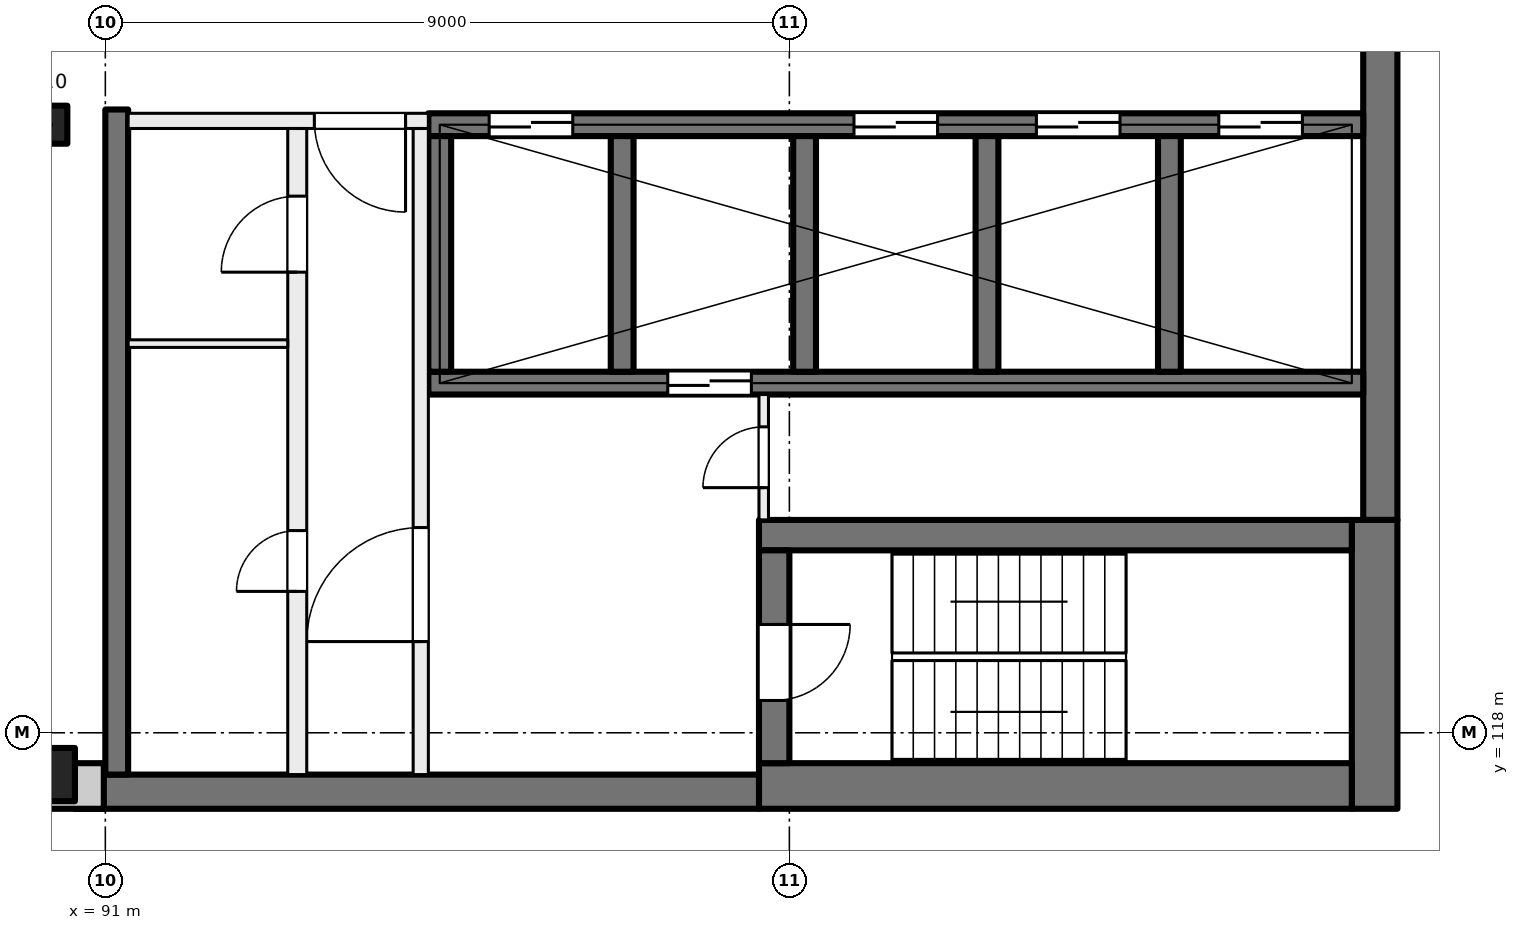
"""IFC4 building model, lengths in metres.
Left out: names, types, materials, properties, quantities, classifications, styles, units other than length and angle.
Written with IfcOpenShell. Run it as: python <this file> out.ifc"""

import sys

from ifc_helpers import new_model, si_unit, direction, frame, frame_2d, origin, origin_2d, place, context, subcontext, project, spatial, rectangle, extrude, element, fill, save


model = new_model("IFC4")
c1 = context("Model", 3, precision=1e-05, world=origin(), true_north=direction((0.0, 1.0)))
c2 = subcontext(c1, "Body", "Model", "MODEL_VIEW")
j1 = project(units=[si_unit("LENGTHUNIT", "METRE"), si_unit("PLANEANGLEUNIT", "RADIAN")], contexts=[c1])
p1 = place(None, origin())
s1 = spatial("IfcSite", under=j1, at=p1, CompositionType="ELEMENT")
p2 = place(p1, origin())
s2 = spatial("IfcBuilding", under=s1, at=p2, CompositionType="ELEMENT")
p3 = place(p2, frame((0.0, 0.0, 261.5)))
s3 = spatial("IfcBuildingStorey", under=s2, at=p3, CompositionType="ELEMENT", Elevation=261.5)
p4 = place(p3, frame((90.25, 126.0, 0.0), z_axis=(0.0, 0.0, 1.0), x_axis=(1.0, 0.0, 0.0)))
e1 = element("IfcColumn", 1, at=p4, inside=s3, PredefinedType="COLUMN", context=c2, shape_type="SweptSolid", body=[
    extrude(rectangle(XDim=0.5, YDim=0.5, at=origin_2d()), origin(), (0.0, 0.0, 1.0), 4.0),
])
p5 = place(p3, frame((90.25, 117.45, 0.0), z_axis=(0.0, 0.0, 1.0), x_axis=(1.0, 0.0, 0.0)))
e2 = element("IfcColumn", 2, at=p5, inside=s3, PredefinedType="COLUMN", context=c2, shape_type="SweptSolid", body=[
    extrude(rectangle(XDim=0.7, YDim=0.7, at=origin_2d()), origin(), (0.0, 0.0, 1.0), 4.0),
])
p6 = place(p3, frame((107.775, 135.2, 0.0), z_axis=(0.0, 0.0, 1.0), x_axis=(0.0, -1.0, 0.0)))
e3 = element("IfcWall", 3, at=p6, inside=s3, PredefinedType="SHEAR", context=c2, shape_type="SweptSolid", body=[
    extrude(rectangle(XDim=14.4, YDim=0.45, at=frame_2d((7.2, 0.0))), origin(), (0.0, 0.0, 1.0), 4.0),
])
p7 = place(p3, frame((107.7, 120.8, 0.0), z_axis=(0.0, 0.0, 1.0), x_axis=(0.0, -1.0, 0.0)))
e4 = element("IfcWall", 4, at=p7, inside=s3, PredefinedType="SHEAR", context=c2, shape_type="SweptSolid", body=[
    extrude(rectangle(XDim=3.8, YDim=0.6, at=frame_2d((1.9, 0.0))), origin(), (0.0, 0.0, 1.0), 4.0),
])
p8 = place(p3, frame((107.4, 117.3, 0.0), z_axis=(0.0, 0.0, 1.0), x_axis=(-1.0, 0.0, 0.0)))
e5 = element("IfcWall", 5, at=p8, inside=s3, PredefinedType="SHEAR", context=c2, shape_type="SweptSolid", body=[
    extrude(rectangle(XDim=7.8, YDim=0.6, at=frame_2d((3.9, 0.0))), origin(), (0.0, 0.0, 1.0), 4.0),
])
p9 = place(p3, frame((99.6, 117.225, 0.0), z_axis=(0.0, 0.0, 1.0), x_axis=(-1.0, 0.0, 0.0)))
e6 = element("IfcWall", 6, at=p9, inside=s3, PredefinedType="SHEAR", context=c2, shape_type="SweptSolid", body=[
    extrude(rectangle(XDim=9.0, YDim=0.45, at=frame_2d((4.5, 0.0))), origin(), (0.0, 0.0, 1.0), 4.0),
])
p10 = place(p3, frame((107.4, 120.6, 0.0), z_axis=(0.0, 0.0, 1.0), x_axis=(-1.0, 0.0, 0.0)))
e7 = element("IfcWall", 7, at=p10, inside=s3, PredefinedType="SHEAR", context=c2, shape_type="SweptSolid", body=[
    extrude(rectangle(XDim=7.8, YDim=0.4, at=frame_2d((3.9, 0.0))), origin(), (0.0, 0.0, 1.0), 4.0),
])
p11 = place(p3, frame((99.8, 120.4, 0.0), z_axis=(0.0, 0.0, 1.0), x_axis=(0.0, -1.0, 0.0)))
e8 = element("IfcWall", 8, at=p11, inside=s3, PredefinedType="SHEAR", context=c2, shape_type="SweptSolid", body=[
    extrude(rectangle(XDim=2.8, YDim=0.4, at=frame_2d((1.4, 0.0))), origin(), (0.0, 0.0, 1.0), 4.0),
])
p12 = place(p11, frame((0.975, 0.0, 0.0)))
e9 = element("IfcOpeningElement", 9, at=p12, cuts=e8, PredefinedType="OPENING", context=c2, shape_type="SweptSolid", body=[
    extrude(rectangle(XDim=1.0, YDim=2.1, at=frame_2d((0.5, 1.05))), frame((0.0, 0.21, 0.0), z_axis=(0.0, -1.0, 0.0), x_axis=(1.0, 0.0, 0.0)), (0.0, 0.0, 1.0), 0.42),
])
p13 = place(p3, frame((107.55, 126.0, 0.0), z_axis=(0.0, 0.0, 1.0), x_axis=(-1.0, 0.0, 0.0)))
e10 = element("IfcWall", 10, at=p13, inside=s3, PredefinedType="SHEAR", context=c2, shape_type="SweptSolid", body=[
    extrude(rectangle(XDim=12.3, YDim=0.3, at=frame_2d((6.15, 0.0))), origin(), (0.0, 0.0, 1.0), 4.0),
])
p14 = place(p13, frame((0.8, 0.0, 0.0)))
e11 = element("IfcOpeningElement", 11, at=p14, cuts=e10, PredefinedType="OPENING", context=c2, shape_type="SweptSolid", body=[
    extrude(rectangle(XDim=1.1, YDim=2.1, at=frame_2d((0.55, 1.05))), frame((0.0, 0.16, 0.0), z_axis=(0.0, -1.0, 0.0), x_axis=(1.0, 0.0, 0.0)), (0.0, 0.0, 1.0), 0.32),
])
p15 = place(p13, frame((3.2, 0.0, 0.0)))
e12 = element("IfcOpeningElement", 12, at=p15, cuts=e10, PredefinedType="OPENING", context=c2, shape_type="SweptSolid", body=[
    extrude(rectangle(XDim=1.1, YDim=2.1, at=frame_2d((0.55, 1.05))), frame((0.0, 0.16, 0.0), z_axis=(0.0, -1.0, 0.0), x_axis=(1.0, 0.0, 0.0)), (0.0, 0.0, 1.0), 0.32),
])
p16 = place(p13, frame((5.6, 0.0, 0.0)))
e13 = element("IfcOpeningElement", 13, at=p16, cuts=e10, PredefinedType="OPENING", context=c2, shape_type="SweptSolid", body=[
    extrude(rectangle(XDim=1.1, YDim=2.1, at=frame_2d((0.55, 1.05))), frame((0.0, 0.16, 0.0), z_axis=(0.0, -1.0, 0.0), x_axis=(1.0, 0.0, 0.0)), (0.0, 0.0, 1.0), 0.32),
])
p17 = place(p13, frame((10.4, 0.0, 0.0)))
e14 = element("IfcOpeningElement", 14, at=p17, cuts=e10, PredefinedType="OPENING", context=c2, shape_type="SweptSolid", body=[
    extrude(rectangle(XDim=1.1, YDim=2.1, at=frame_2d((0.55, 1.05))), frame((0.0, 0.16, 0.0), z_axis=(0.0, -1.0, 0.0), x_axis=(1.0, 0.0, 0.0)), (0.0, 0.0, 1.0), 0.32),
])
p18 = place(p3, frame((107.55, 122.6, 0.0), z_axis=(0.0, 0.0, 1.0), x_axis=(-1.0, 0.0, 0.0)))
e15 = element("IfcWall", 15, at=p18, inside=s3, PredefinedType="SHEAR", context=c2, shape_type="SweptSolid", body=[
    extrude(rectangle(XDim=12.3, YDim=0.3, at=frame_2d((6.15, 0.0))), origin(), (0.0, 0.0, 1.0), 4.0),
])
p19 = place(p18, frame((8.05, 0.0, 0.0)))
e16 = element("IfcOpeningElement", 16, at=p19, cuts=e15, PredefinedType="OPENING", context=c2, shape_type="SweptSolid", body=[
    extrude(rectangle(XDim=1.1, YDim=2.1, at=frame_2d((0.55, 1.05))), frame((0.0, 0.16, 0.0), z_axis=(0.0, -1.0, 0.0), x_axis=(1.0, 0.0, 0.0)), (0.0, 0.0, 1.0), 0.32),
])
for number, where, z_axis, x_axis in (
    (17, (105.0, 125.85, 0.0), (0.0, 0.0, 1.0), (0.0, -1.0, 0.0)),
    (18, (102.6, 125.85, 0.0), (0.0, 0.0, 1.0), (0.0, -1.0, 0.0)),
    (19, (100.2, 125.85, 0.0), (0.0, 0.0, 1.0), (0.0, -1.0, 0.0)),
    (20, (97.8, 125.85, 0.0), (0.0, 0.0, 1.0), (0.0, -1.0, 0.0)),
    (21, (95.4, 125.85, 0.0), (0.0, 0.0, 1.0), (0.0, -1.0, 0.0)),
):
    element("IfcWall", number, at=place(p3, frame(where, z_axis=z_axis, x_axis=x_axis)), inside=s3, PredefinedType="SHEAR", context=c2, shape_type="SweptSolid", body=[
        extrude(rectangle(XDim=3.1, YDim=0.3, at=frame_2d((1.55, 0.0))), origin(), (0.0, 0.0, 1.0), 4.0),
    ])
p20 = place(p3, frame((91.15, 126.2, 0.0), z_axis=(0.0, 0.0, 1.0), x_axis=(0.0, -1.0, 0.0)))
e22 = element("IfcWall", 22, at=p20, inside=s3, PredefinedType="SHEAR", context=c2, shape_type="SweptSolid", body=[
    extrude(rectangle(XDim=8.75, YDim=0.3, at=frame_2d((4.375, 0.0))), origin(), (0.0, 0.0, 1.0), 4.0),
])
p21 = place(p3, frame((90.98, 117.3, 0.0), z_axis=(0.0, 0.0, 1.0), x_axis=(-1.0, 0.0, 0.0)))
e23 = element("IfcWall", 23, at=p21, inside=s3, PredefinedType="SOLIDWALL", context=c2, shape_type="SweptSolid", body=[
    extrude(rectangle(XDim=43.98, YDim=0.6, at=frame_2d((21.99, 0.0))), origin(), (0.0, 0.0, 1.0), 3.625),
])
p22 = place(p21, frame((1.48, 0.0, 0.9)))
e24 = element("IfcOpeningElement", 24, at=p22, cuts=e23, PredefinedType="OPENING", context=c2, shape_type="SweptSolid", body=[
    extrude(rectangle(XDim=3.0, YDim=2.4, at=frame_2d((1.5, 1.2))), frame((0.0, 0.31, 0.0), z_axis=(0.0, -1.0, 0.0), x_axis=(1.0, 0.0, 0.0)), (0.0, 0.0, 1.0), 0.62),
])
p23 = place(p21, frame((5.98, 0.0, 0.9)))
e25 = element("IfcOpeningElement", 25, at=p23, cuts=e23, PredefinedType="OPENING", context=c2, shape_type="SweptSolid", body=[
    extrude(rectangle(XDim=3.0, YDim=2.4, at=frame_2d((1.5, 1.2))), frame((0.0, 0.31, 0.0), z_axis=(0.0, -1.0, 0.0), x_axis=(1.0, 0.0, 0.0)), (0.0, 0.0, 1.0), 0.62),
])
p24 = place(p21, frame((10.48, 0.0, 0.9)))
e26 = element("IfcOpeningElement", 26, at=p24, cuts=e23, PredefinedType="OPENING", context=c2, shape_type="SweptSolid", body=[
    extrude(rectangle(XDim=3.0, YDim=2.4, at=frame_2d((1.5, 1.2))), frame((0.0, 0.31, 0.0), z_axis=(0.0, -1.0, 0.0), x_axis=(1.0, 0.0, 0.0)), (0.0, 0.0, 1.0), 0.62),
])
p25 = place(p21, frame((14.98, 0.0, 0.9)))
e27 = element("IfcOpeningElement", 27, at=p25, cuts=e23, PredefinedType="OPENING", context=c2, shape_type="SweptSolid", body=[
    extrude(rectangle(XDim=3.0, YDim=2.4, at=frame_2d((1.5, 1.2))), frame((0.0, 0.31, 0.0), z_axis=(0.0, -1.0, 0.0), x_axis=(1.0, 0.0, 0.0)), (0.0, 0.0, 1.0), 0.62),
])
p26 = place(p21, frame((19.48, 0.0, 0.9)))
e28 = element("IfcOpeningElement", 28, at=p26, cuts=e23, PredefinedType="OPENING", context=c2, shape_type="SweptSolid", body=[
    extrude(rectangle(XDim=3.0, YDim=2.4, at=frame_2d((1.5, 1.2))), frame((0.0, 0.31, 0.0), z_axis=(0.0, -1.0, 0.0), x_axis=(1.0, 0.0, 0.0)), (0.0, 0.0, 1.0), 0.62),
])
p27 = place(p21, frame((23.98, 0.0, 0.9)))
e29 = element("IfcOpeningElement", 29, at=p27, cuts=e23, PredefinedType="OPENING", context=c2, shape_type="SweptSolid", body=[
    extrude(rectangle(XDim=3.0, YDim=2.4, at=frame_2d((1.5, 1.2))), frame((0.0, 0.31, 0.0), z_axis=(0.0, -1.0, 0.0), x_axis=(1.0, 0.0, 0.0)), (0.0, 0.0, 1.0), 0.62),
])
p28 = place(p21, frame((28.48, 0.0, 0.9)))
e30 = element("IfcOpeningElement", 30, at=p28, cuts=e23, PredefinedType="OPENING", context=c2, shape_type="SweptSolid", body=[
    extrude(rectangle(XDim=3.0, YDim=2.4, at=frame_2d((1.5, 1.2))), frame((0.0, 0.31, 0.0), z_axis=(0.0, -1.0, 0.0), x_axis=(1.0, 0.0, 0.0)), (0.0, 0.0, 1.0), 0.62),
])
p29 = place(p21, frame((32.98, 0.0, 0.9)))
e31 = element("IfcOpeningElement", 31, at=p29, cuts=e23, PredefinedType="OPENING", context=c2, shape_type="SweptSolid", body=[
    extrude(rectangle(XDim=3.0, YDim=2.4, at=frame_2d((1.5, 1.2))), frame((0.0, 0.31, 0.0), z_axis=(0.0, -1.0, 0.0), x_axis=(1.0, 0.0, 0.0)), (0.0, 0.0, 1.0), 0.62),
])
p30 = place(p21, frame((37.48, 0.0, 0.9)))
e32 = element("IfcOpeningElement", 32, at=p30, cuts=e23, PredefinedType="OPENING", context=c2, shape_type="SweptSolid", body=[
    extrude(rectangle(XDim=3.0, YDim=2.4, at=frame_2d((1.5, 1.2))), frame((0.0, 0.31, 0.0), z_axis=(0.0, -1.0, 0.0), x_axis=(1.0, 0.0, 0.0)), (0.0, 0.0, 1.0), 0.62),
])
p31 = place(p3, frame((95.25, 126.05, 0.0), z_axis=(0.0, 0.0, 1.0), x_axis=(-1.0, 0.0, 0.0)))
e33 = element("IfcWall", 33, at=p31, inside=s3, PredefinedType="PARTITIONING", context=c2, shape_type="SweptSolid", body=[
    extrude(rectangle(XDim=3.95, YDim=0.2, at=frame_2d((1.975, 0.0))), origin(), (0.0, 0.0, 1.0), 3.625),
])
p32 = place(p31, frame((0.3, 0.0, 0.0)))
e34 = element("IfcOpeningElement", 34, at=p32, cuts=e33, PredefinedType="OPENING", context=c2, shape_type="SweptSolid", body=[
    extrude(rectangle(XDim=1.2, YDim=2.1, at=frame_2d((0.6, 1.05))), frame((0.0, 0.11, 0.0), z_axis=(0.0, -1.0, 0.0), x_axis=(1.0, 0.0, 0.0)), (0.0, 0.0, 1.0), 0.22),
])
p33 = place(p3, frame((95.15, 117.45, 0.0), z_axis=(0.0, 0.0, 1.0), x_axis=(0.0, 1.0, 0.0)))
e35 = element("IfcWall", 35, at=p33, inside=s3, PredefinedType="PARTITIONING", context=c2, shape_type="SweptSolid", body=[
    extrude(rectangle(XDim=8.5, YDim=0.2, at=frame_2d((4.25, 0.0))), origin(), (0.0, 0.0, 1.0), 3.625),
])
p34 = place(p33, frame((1.75, 0.0, 0.0)))
e36 = element("IfcOpeningElement", 36, at=p34, cuts=e35, PredefinedType="OPENING", context=c2, shape_type="SweptSolid", body=[
    extrude(rectangle(XDim=1.5, YDim=2.1, at=frame_2d((0.75, 1.05))), frame((0.0, 0.11, 0.0), z_axis=(0.0, -1.0, 0.0), x_axis=(1.0, 0.0, 0.0)), (0.0, 0.0, 1.0), 0.22),
])
p35 = place(p3, frame((93.525, 117.45, 0.0), z_axis=(0.0, 0.0, 1.0), x_axis=(0.0, 1.0, 0.0)))
e37 = element("IfcWall", 37, at=p35, inside=s3, PredefinedType="PARTITIONING", context=c2, shape_type="SweptSolid", body=[
    extrude(rectangle(XDim=8.5, YDim=0.25, at=frame_2d((4.25, 0.0))), origin(), (0.0, 0.0, 1.0), 3.625),
])
p36 = place(p35, frame((6.61, 0.0, 0.0)))
e38 = element("IfcOpeningElement", 38, at=p36, cuts=e37, PredefinedType="OPENING", context=c2, shape_type="SweptSolid", body=[
    extrude(rectangle(XDim=1.0, YDim=2.1, at=frame_2d((0.5, 1.05))), frame((0.0, 0.135, 0.0), z_axis=(0.0, -1.0, 0.0), x_axis=(1.0, 0.0, 0.0)), (0.0, 0.0, 1.0), 0.27),
])
p37 = place(p35, frame((2.41, 0.0, 0.0)))
e39 = element("IfcOpeningElement", 39, at=p37, cuts=e37, PredefinedType="OPENING", context=c2, shape_type="SweptSolid", body=[
    extrude(rectangle(XDim=0.8, YDim=2.1, at=frame_2d((0.4, 1.05))), frame((0.0, 0.135, 0.0), z_axis=(0.0, -1.0, 0.0), x_axis=(1.0, 0.0, 0.0)), (0.0, 0.0, 1.0), 0.27),
])
p38 = place(p3, frame((99.663, 120.8, 0.0), z_axis=(0.0, 0.0, 1.0), x_axis=(0.0, 1.0, 0.0)))
e40 = element("IfcWall", 40, at=p38, inside=s3, PredefinedType="PARTITIONING", context=c2, shape_type="SweptSolid", body=[
    extrude(rectangle(XDim=1.65, YDim=0.125, at=frame_2d((0.825, 0.0))), origin(), (0.0, 0.0, 1.0), 3.625),
])
p39 = place(p38, frame((0.425, 0.0, 0.0)))
e41 = element("IfcOpeningElement", 41, at=p39, cuts=e40, PredefinedType="OPENING", context=c2, shape_type="SweptSolid", body=[
    extrude(rectangle(XDim=0.8, YDim=2.1, at=frame_2d((0.4, 1.05))), frame((0.0, 0.073, 0.0), z_axis=(0.0, -1.0, 0.0), x_axis=(1.0, 0.0, 0.0)), (0.0, 0.0, 1.0), 0.145),
])
p40 = place(p3, frame((93.4, 123.12, 0.0), z_axis=(0.0, 0.0, 1.0), x_axis=(-1.0, 0.0, 0.0)))
e42 = element("IfcWall", 42, at=p40, inside=s3, PredefinedType="PARTITIONING", context=c2, shape_type="SweptSolid", body=[
    extrude(rectangle(XDim=2.1, YDim=0.1, at=frame_2d((1.05, 0.0))), origin(), (0.0, 0.0, 1.0), 3.625),
])
p41 = place(p14, origin())
e43 = element("IfcDoor", 43, at=p41, inside=s3, OperationType="DOUBLE_DOOR_SLIDING", PredefinedType="DOOR", context=c2, shape_type="SweptSolid", body=[
    extrude(rectangle(XDim=1.1, YDim=2.1, at=frame_2d((0.55, 1.05))), frame((0.0, 0.025, 0.0), z_axis=(0.0, -1.0, 0.0), x_axis=(1.0, 0.0, 0.0)), (0.0, 0.0, 1.0), 0.05),
])
fill(e11, e43)
p42 = place(p15, origin())
e44 = element("IfcDoor", 44, at=p42, inside=s3, OperationType="DOUBLE_DOOR_SLIDING", PredefinedType="DOOR", context=c2, shape_type="SweptSolid", body=[
    extrude(rectangle(XDim=1.1, YDim=2.1, at=frame_2d((0.55, 1.05))), frame((0.0, 0.025, 0.0), z_axis=(0.0, -1.0, 0.0), x_axis=(1.0, 0.0, 0.0)), (0.0, 0.0, 1.0), 0.05),
])
fill(e12, e44)
p43 = place(p16, origin())
e45 = element("IfcDoor", 45, at=p43, inside=s3, OperationType="DOUBLE_DOOR_SLIDING", PredefinedType="DOOR", context=c2, shape_type="SweptSolid", body=[
    extrude(rectangle(XDim=1.1, YDim=2.1, at=frame_2d((0.55, 1.05))), frame((0.0, 0.025, 0.0), z_axis=(0.0, -1.0, 0.0), x_axis=(1.0, 0.0, 0.0)), (0.0, 0.0, 1.0), 0.05),
])
fill(e13, e45)
p44 = place(p17, origin())
e46 = element("IfcDoor", 46, at=p44, inside=s3, OperationType="DOUBLE_DOOR_SLIDING", PredefinedType="DOOR", context=c2, shape_type="SweptSolid", body=[
    extrude(rectangle(XDim=1.1, YDim=2.1, at=frame_2d((0.55, 1.05))), frame((0.0, 0.025, 0.0), z_axis=(0.0, -1.0, 0.0), x_axis=(1.0, 0.0, 0.0)), (0.0, 0.0, 1.0), 0.05),
])
fill(e14, e46)
p45 = place(p32, origin())
e47 = element("IfcDoor", 47, at=p45, inside=s3, OperationType="DOUBLE_DOOR_SINGLE_SWING", PredefinedType="DOOR", context=c2, shape_type="SweptSolid", body=[
    extrude(rectangle(XDim=1.2, YDim=2.1, at=frame_2d((0.6, 1.05))), frame((0.0, 0.025, 0.0), z_axis=(0.0, -1.0, 0.0), x_axis=(1.0, 0.0, 0.0)), (0.0, 0.0, 1.0), 0.05),
])
fill(e34, e47)
p46 = place(p34, origin())
e48 = element("IfcDoor", 48, at=p46, inside=s3, OperationType="DOUBLE_DOOR_SINGLE_SWING", PredefinedType="DOOR", context=c2, shape_type="SweptSolid", body=[
    extrude(rectangle(XDim=1.5, YDim=2.1, at=frame_2d((0.75, 1.05))), frame((0.0, 0.025, 0.0), z_axis=(0.0, -1.0, 0.0), x_axis=(1.0, 0.0, 0.0)), (0.0, 0.0, 1.0), 0.05),
])
fill(e36, e48)
p47 = place(p12, origin())
e49 = element("IfcDoor", 49, at=p47, inside=s3, OperationType="SINGLE_SWING_LEFT", PredefinedType="DOOR", context=c2, shape_type="SweptSolid", body=[
    extrude(rectangle(XDim=1.0, YDim=2.1, at=frame_2d((0.5, 1.05))), frame((0.0, 0.025, 0.0), z_axis=(0.0, -1.0, 0.0), x_axis=(1.0, 0.0, 0.0)), (0.0, 0.0, 1.0), 0.05),
])
fill(e9, e49)
p48 = place(p39, origin())
e50 = element("IfcDoor", 50, at=p48, inside=s3, OperationType="SINGLE_SWING_RIGHT", PredefinedType="DOOR", context=c2, shape_type="SweptSolid", body=[
    extrude(rectangle(XDim=0.8, YDim=2.1, at=frame_2d((0.4, 1.05))), frame((0.0, 0.025, 0.0), z_axis=(0.0, -1.0, 0.0), x_axis=(1.0, 0.0, 0.0)), (0.0, 0.0, 1.0), 0.05),
])
fill(e41, e50)
p49 = place(p36, origin())
e51 = element("IfcDoor", 51, at=p49, inside=s3, OperationType="SINGLE_SWING_LEFT", PredefinedType="DOOR", context=c2, shape_type="SweptSolid", body=[
    extrude(rectangle(XDim=1.0, YDim=2.1, at=frame_2d((0.5, 1.05))), frame((0.0, 0.025, 0.0), z_axis=(0.0, -1.0, 0.0), x_axis=(1.0, 0.0, 0.0)), (0.0, 0.0, 1.0), 0.05),
])
fill(e38, e51)
p50 = place(p37, origin())
e52 = element("IfcDoor", 52, at=p50, inside=s3, OperationType="SINGLE_SWING_RIGHT", PredefinedType="DOOR", context=c2, shape_type="SweptSolid", body=[
    extrude(rectangle(XDim=0.8, YDim=2.1, at=frame_2d((0.4, 1.05))), frame((0.0, 0.025, 0.0), z_axis=(0.0, -1.0, 0.0), x_axis=(1.0, 0.0, 0.0)), (0.0, 0.0, 1.0), 0.05),
])
fill(e39, e52)
p51 = place(p19, origin())
e53 = element("IfcDoor", 53, at=p51, inside=s3, OperationType="DOUBLE_DOOR_SLIDING", PredefinedType="DOOR", context=c2, shape_type="SweptSolid", body=[
    extrude(rectangle(XDim=1.1, YDim=2.1, at=frame_2d((0.55, 1.05))), frame((0.0, 0.025, 0.0), z_axis=(0.0, -1.0, 0.0), x_axis=(1.0, 0.0, 0.0)), (0.0, 0.0, 1.0), 0.05),
])
fill(e16, e53)
save(model, sys.argv[1])
